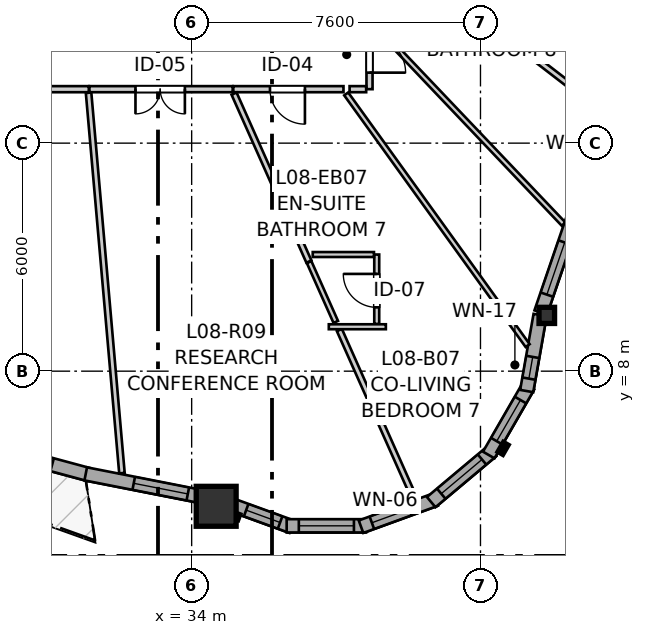
"""IFC4 building model, lengths in metres.
Left out: names, types, materials, properties, quantities, classifications, styles, units other than length and angle.
Written with IfcOpenShell. Run it as: python <this file> out.ifc"""

import sys

from ifc_helpers import new_model, si_unit, direction, frame, frame_2d, origin, origin_2d, place, context, subcontext, project, spatial, rectangle, i_section, extrude, source, transform, mapped, element, fill, save


model = new_model("IFC4")
c1 = context("Model", 3, precision=1e-05, world=origin(), true_north=direction((0.0, 1.0)))
c2 = subcontext(c1, "Body", "Model", "MODEL_VIEW")
j1 = project(units=[si_unit("LENGTHUNIT", "METRE"), si_unit("PLANEANGLEUNIT", "RADIAN")], contexts=[c1])
p1 = place(None, origin())
s1 = spatial("IfcSite", under=j1, at=p1, CompositionType="ELEMENT")
p2 = place(p1, origin())
s2 = spatial("IfcBuilding", under=s1, at=p2, CompositionType="ELEMENT")
p3 = place(p2, frame((0.0, 0.0, 30.2)))
s3 = spatial("IfcBuildingStorey", under=s2, at=p3, CompositionType="ELEMENT", Elevation=30.2)
m1 = source(origin(), c2, "Body", "SweptSolid", [
    extrude(rectangle(XDim=1.05, YDim=1.05, at=origin_2d()), origin(), (0.0, 0.0, 1.0), 2.935),
])
p4 = place(p3, frame((34.645, 4.445, 0.0), z_axis=(0.0, 0.0, 1.0), x_axis=(1.0, 0.0, 0.0)))
e1 = element("IfcColumn", 1, at=p4, inside=s3, PredefinedType="COLUMN", context=c2, shape_type="MappedRepresentation", body=[
    mapped(m1, transform((0.0, 0.0, 0.0), x_axis=(1.0, 0.0, 0.0), y_axis=(0.0, 1.0, 0.0), z_axis=(0.0, 0.0, 1.0), scale=1.0)),
])
m2 = source(origin(), c2, "Body", "SweptSolid", [
    extrude(i_section(OverallWidth=0.409, OverallDepth=0.425, WebThickness=0.03, FlangeThickness=0.048, FilletRadius=0.015, at=origin_2d()), origin(), (0.0, 0.0, 1.0), 2.935),
])
p5 = place(p3, frame((43.345, 9.468, 0.0), z_axis=(0.0, 0.0, 1.0), x_axis=(1.0, 0.0, 0.0)))
e2 = element("IfcColumn", 2, at=p5, inside=s3, PredefinedType="PILASTER", context=c2, shape_type="MappedRepresentation", body=[
    mapped(m2, transform((0.0, 0.0, 0.0), x_axis=(1.0, 0.0, 0.0), y_axis=(0.0, 1.0, 0.0), z_axis=(0.0, 0.0, 1.0), scale=1.0)),
])
p6 = place(p3, frame((27.978, 6.174, 0.0), z_axis=(0.0, 0.0, 1.0), x_axis=(0.965451765427, -0.260581827136, 0.0)))
e3 = element("IfcWall", 3, at=p6, inside=s3, PredefinedType="SOLIDWALL", context=c2, shape_type="SweptSolid", body=[
    extrude(rectangle(XDim=3.439, YDim=0.35, at=frame_2d((1.72, 0.0))), origin(), (0.0, 0.0, 1.0), 2.415),
])
p7 = place(p6, frame((0.985, 0.0, 0.82)))
e4 = element("IfcOpeningElement", 4, at=p7, cuts=e3, PredefinedType="OPENING", context=c2, shape_type="SweptSolid", body=[
    extrude(rectangle(XDim=1.45, YDim=1.25, at=frame_2d((0.725, 0.625))), frame((0.0, 0.185, 0.0), z_axis=(0.0, -1.0, 0.0), x_axis=(1.0, 0.0, 0.0)), (0.0, 0.0, 1.0), 0.37),
])
p8 = place(p3, frame((31.213, 5.298, 0.0), z_axis=(0.0, 0.0, 1.0), x_axis=(0.9812345335, -0.192818023709, 0.0)))
e5 = element("IfcWall", 5, at=p8, inside=s3, PredefinedType="SOLIDWALL", context=c2, shape_type="SweptSolid", body=[
    extrude(rectangle(XDim=3.232, YDim=0.35, at=frame_2d((1.616, 0.0))), origin(), (0.0, 0.0, 1.0), 2.415),
])
p9 = place(p8, frame((1.287, 0.0, 0.82)))
e6 = element("IfcOpeningElement", 6, at=p9, cuts=e5, PredefinedType="OPENING", context=c2, shape_type="SweptSolid", body=[
    extrude(rectangle(XDim=1.45, YDim=1.25, at=frame_2d((0.725, 0.625))), frame((0.0, 0.185, 0.0), z_axis=(0.0, -1.0, 0.0), x_axis=(1.0, 0.0, 0.0)), (0.0, 0.0, 1.0), 0.37),
])
p10 = place(p3, frame((34.987, 4.506, 0.0), z_axis=(0.0, 0.0, 1.0), x_axis=(0.939720171257, -0.341944439541, 0.0)))
e7 = element("IfcWall", 7, at=p10, inside=s3, PredefinedType="SOLIDWALL", context=c2, shape_type="SweptSolid", body=[
    extrude(rectangle(XDim=1.752, YDim=0.35, at=frame_2d((0.876, 0.0))), origin(), (0.0, 0.0, 1.0), 2.415),
])
p11 = place(p10, frame((0.476, 0.0, 0.82)))
e8 = element("IfcOpeningElement", 8, at=p11, cuts=e7, PredefinedType="OPENING", context=c2, shape_type="SweptSolid", body=[
    extrude(rectangle(XDim=0.95, YDim=1.35, at=frame_2d((0.475, 0.675))), frame((0.0, 0.185, 0.0), z_axis=(0.0, -1.0, 0.0), x_axis=(1.0, 0.0, 0.0)), (0.0, 0.0, 1.0), 0.37),
])
p12 = place(p3, frame((36.5, 3.931, 0.0), z_axis=(0.0, 0.0, 1.0), x_axis=(1.0, 0.0, 0.0)))
e9 = element("IfcWall", 9, at=p12, inside=s3, PredefinedType="SOLIDWALL", context=c2, shape_type="SweptSolid", body=[
    extrude(rectangle(XDim=2.09, YDim=0.35, at=frame_2d((1.045, 0.0))), origin(), (0.0, 0.0, 1.0), 2.415),
])
p13 = place(p12, frame((0.32, 0.0, 0.82)))
e10 = element("IfcOpeningElement", 10, at=p13, cuts=e9, PredefinedType="OPENING", context=c2, shape_type="SweptSolid", body=[
    extrude(rectangle(XDim=1.45, YDim=1.25, at=frame_2d((0.725, 0.625))), frame((0.0, 0.185, 0.0), z_axis=(0.0, -1.0, 0.0), x_axis=(1.0, 0.0, 0.0)), (0.0, 0.0, 1.0), 0.37),
])
p14 = place(p3, frame((38.457, 3.907, 0.0), z_axis=(0.0, 0.0, 1.0), x_axis=(0.939711556618, 0.341968113072, 0.0)))
e11 = element("IfcWall", 11, at=p14, inside=s3, PredefinedType="SOLIDWALL", context=c2, shape_type="SweptSolid", body=[
    extrude(rectangle(XDim=2.09, YDim=0.35, at=frame_2d((1.045, 0.0))), origin(), (0.0, 0.0, 1.0), 2.415),
])
p15 = place(p14, frame((0.304, 0.0, 0.82)))
e12 = element("IfcOpeningElement", 12, at=p15, cuts=e11, PredefinedType="OPENING", context=c2, shape_type="SweptSolid", body=[
    extrude(rectangle(XDim=1.05, YDim=1.45, at=frame_2d((0.525, 0.725))), frame((0.0, 0.185, 0.0), z_axis=(0.0, -1.0, 0.0), x_axis=(1.0, 0.0, 0.0)), (0.0, 0.0, 1.0), 0.37),
])
p16 = place(p3, frame((40.303, 4.554, 0.0), z_axis=(0.0, 0.0, 1.0), x_axis=(0.766024572719, 0.642811289563, 0.0)))
e13 = element("IfcWall", 13, at=p16, inside=s3, PredefinedType="SOLIDWALL", context=c2, shape_type="SweptSolid", body=[
    extrude(rectangle(XDim=2.09, YDim=0.35, at=frame_2d((1.045, 0.0))), origin(), (0.0, 0.0, 1.0), 2.415),
])
p17 = place(p16, frame((0.345, 0.0, 0.82)))
e14 = element("IfcOpeningElement", 14, at=p17, cuts=e13, PredefinedType="OPENING", context=c2, shape_type="SweptSolid", body=[
    extrude(rectangle(XDim=1.4, YDim=1.35, at=frame_2d((0.7, 0.675))), frame((0.0, 0.185, 0.0), z_axis=(0.0, -1.0, 0.0), x_axis=(1.0, 0.0, 0.0)), (0.0, 0.0, 1.0), 0.37),
])
p18 = place(p3, frame((41.817, 5.794, 0.0), z_axis=(0.0, 0.0, 1.0), x_axis=(0.499995423472, 0.866028046028, 0.0)))
e15 = element("IfcWall", 15, at=p18, inside=s3, PredefinedType="SOLIDWALL", context=c2, shape_type="SweptSolid", body=[
    extrude(rectangle(XDim=2.09, YDim=0.35, at=frame_2d((1.045, 0.0))), origin(), (0.0, 0.0, 1.0), 2.415),
])
p19 = place(p18, frame((0.42, 0.0, 0.82)))
e16 = element("IfcOpeningElement", 16, at=p19, cuts=e15, PredefinedType="OPENING", context=c2, shape_type="SweptSolid", body=[
    extrude(rectangle(XDim=1.25, YDim=1.35, at=frame_2d((0.625, 0.675))), frame((0.0, 0.185, 0.0), z_axis=(0.0, -1.0, 0.0), x_axis=(1.0, 0.0, 0.0)), (0.0, 0.0, 1.0), 0.37),
])
p20 = place(p3, frame((42.816, 7.477, 0.0), z_axis=(0.0, 0.0, 1.0), x_axis=(0.173586593252, 0.984818610021, 0.0)))
e17 = element("IfcWall", 17, at=p20, inside=s3, PredefinedType="SOLIDWALL", context=c2, shape_type="SweptSolid", body=[
    extrude(rectangle(XDim=2.032, YDim=0.35, at=frame_2d((1.016, 0.0))), origin(), (0.0, 0.0, 1.0), 2.415),
])
p21 = place(p20, frame((0.332, 0.0, 0.82)))
e18 = element("IfcOpeningElement", 18, at=p21, cuts=e17, PredefinedType="OPENING", context=c2, shape_type="SweptSolid", body=[
    extrude(rectangle(XDim=0.58, YDim=1.35, at=frame_2d((0.29, 0.675))), frame((0.0, 0.185, 0.0), z_axis=(0.0, -1.0, 0.0), x_axis=(1.0, 0.0, 0.0)), (0.0, 0.0, 1.0), 0.37),
])
p22 = place(p3, frame((43.186, 9.543, 0.0), z_axis=(0.0, 0.0, 1.0), x_axis=(0.323620542135, 0.946186950189, 0.0)))
e19 = element("IfcWall", 19, at=p22, inside=s3, PredefinedType="SOLIDWALL", context=c2, shape_type="SweptSolid", body=[
    extrude(rectangle(XDim=3.512, YDim=0.35, at=frame_2d((1.756, 0.0))), origin(), (0.0, 0.0, 1.0), 2.415),
])
p23 = place(p22, frame((0.498, 0.0, 0.82)))
e20 = element("IfcOpeningElement", 20, at=p23, cuts=e19, PredefinedType="OPENING", context=c2, shape_type="SweptSolid", body=[
    extrude(rectangle(XDim=1.45, YDim=1.25, at=frame_2d((0.725, 0.625))), frame((0.0, 0.185, 0.0), z_axis=(0.0, -1.0, 0.0), x_axis=(1.0, 0.0, 0.0)), (0.0, 0.0, 1.0), 0.37),
])
p24 = place(p22, frame((2.619, 0.0, 0.82)))
e21 = element("IfcOpeningElement", 21, at=p24, cuts=e19, PredefinedType="OPENING", context=c2, shape_type="SweptSolid", body=[
    extrude(rectangle(XDim=0.58, YDim=1.35, at=frame_2d((0.29, 0.675))), frame((0.0, 0.185, 0.0), z_axis=(0.0, -1.0, 0.0), x_axis=(1.0, 0.0, 0.0)), (0.0, 0.0, 1.0), 0.37),
])
p25 = place(p3, frame((31.294, 15.42, 0.0), z_axis=(0.0, 0.0, 1.0), x_axis=(-1.0, 0.0, 0.0)))
e22 = element("IfcWall", 22, at=p25, inside=s3, PredefinedType="PARTITIONING", context=c2, shape_type="SweptSolid", body=[
    extrude(rectangle(XDim=5.554, YDim=0.16, at=frame_2d((2.777, 0.0))), origin(), (0.0, 0.0, 1.0), 2.935),
])
p26 = place(p25, frame((2.126, 0.0, 0.0)))
e23 = element("IfcOpeningElement", 23, at=p26, cuts=e22, PredefinedType="OPENING", context=c2, shape_type="SweptSolid", body=[
    extrude(rectangle(XDim=1.3, YDim=2.1, at=frame_2d((0.65, 1.05))), frame((0.0, 0.09, 0.0), z_axis=(0.0, -1.0, 0.0), x_axis=(1.0, 0.0, 0.0)), (0.0, 0.0, 1.0), 0.18),
])
p27 = place(p3, frame((35.08, 15.42, 0.0), z_axis=(0.0, 0.0, 1.0), x_axis=(-1.0, 0.0, 0.0)))
e24 = element("IfcWall", 24, at=p27, inside=s3, PredefinedType="PARTITIONING", context=c2, shape_type="SweptSolid", body=[
    extrude(rectangle(XDim=3.771, YDim=0.16, at=frame_2d((1.885, 0.0))), origin(), (0.0, 0.0, 1.0), 2.935),
])
p28 = place(p27, frame((1.259, 0.0, 0.0)))
e25 = element("IfcOpeningElement", 25, at=p28, cuts=e24, PredefinedType="OPENING", context=c2, shape_type="SweptSolid", body=[
    extrude(rectangle(XDim=1.3, YDim=2.1, at=frame_2d((0.65, 1.05))), frame((0.0, 0.09, 0.0), z_axis=(0.0, -1.0, 0.0), x_axis=(1.0, 0.0, 0.0)), (0.0, 0.0, 1.0), 0.18),
])
p29 = place(p3, frame((37.995, 15.42, 0.0), z_axis=(0.0, 0.0, 1.0), x_axis=(-1.0, 0.0, 0.0)))
e26 = element("IfcWall", 26, at=p29, inside=s3, PredefinedType="PARTITIONING", context=c2, shape_type="SweptSolid", body=[
    extrude(rectangle(XDim=2.9, YDim=0.16, at=frame_2d((1.45, 0.0))), origin(), (0.0, 0.0, 1.0), 2.935),
])
p30 = place(p29, frame((1.014, 0.0, 0.0)))
e27 = element("IfcOpeningElement", 27, at=p30, cuts=e26, PredefinedType="OPENING", context=c2, shape_type="SweptSolid", body=[
    extrude(rectangle(XDim=0.92, YDim=2.1, at=frame_2d((0.46, 1.05))), frame((0.0, 0.09, 0.0), z_axis=(0.0, -1.0, 0.0), x_axis=(1.0, 0.0, 0.0)), (0.0, 0.0, 1.0), 0.18),
])
p31 = place(p3, frame((38.87, 9.242, 0.0), z_axis=(0.0, 0.0, 1.0), x_axis=(0.0, 1.0, 0.0)))
e28 = element("IfcWall", 28, at=p31, inside=s3, PredefinedType="PARTITIONING", context=c2, shape_type="SweptSolid", body=[
    extrude(rectangle(XDim=1.827, YDim=0.13, at=frame_2d((0.914, 0.0))), origin(), (0.0, 0.0, 1.0), 2.935),
])
p32 = place(p31, frame((0.437, 0.0, 0.0)))
e29 = element("IfcOpeningElement", 29, at=p32, cuts=e28, PredefinedType="OPENING", context=c2, shape_type="SweptSolid", body=[
    extrude(rectangle(XDim=0.88, YDim=2.05, at=frame_2d((0.44, 1.025))), frame((0.0, 0.075, 0.0), z_axis=(0.0, -1.0, 0.0), x_axis=(1.0, 0.0, 0.0)), (0.0, 0.0, 1.0), 0.15),
])
p33 = place(p3, frame((38.68, 17.203, 0.0), z_axis=(0.0, 0.0, 1.0), x_axis=(0.0, -1.0, 0.0)))
e30 = element("IfcWall", 30, at=p33, inside=s3, PredefinedType="PARTITIONING", context=c2, shape_type="SweptSolid", body=[
    extrude(rectangle(XDim=1.783, YDim=0.16, at=frame_2d((0.892, 0.0))), origin(), (0.0, 0.0, 1.0), 2.935),
])
p34 = place(p33, frame((0.398, 0.0, 0.0)))
e31 = element("IfcOpeningElement", 31, at=p34, cuts=e30, PredefinedType="OPENING", context=c2, shape_type="SweptSolid", body=[
    extrude(rectangle(XDim=0.95, YDim=2.1, at=frame_2d((0.475, 1.05))), frame((0.0, 0.09, 0.0), z_axis=(0.0, -1.0, 0.0), x_axis=(1.0, 0.0, 0.0)), (0.0, 0.0, 1.0), 0.18),
])
p35 = place(p3, frame((31.287, 15.326, 0.0), z_axis=(0.0, 0.0, 1.0), x_axis=(0.087404477037, -0.99617290537, 0.0)))
e32 = element("IfcWall", 32, at=p35, inside=s3, PredefinedType="PARTITIONING", context=c2, shape_type="SweptSolid", body=[
    extrude(rectangle(XDim=10.047, YDim=0.145, at=frame_2d((5.023, 0.0))), origin(), (0.0, 0.0, 1.0), 2.935),
])
p36 = place(p3, frame((38.067, 15.295, 0.0), z_axis=(0.0, 0.0, 1.0), x_axis=(0.584777320582, -0.811193864211, 0.0)))
e33 = element("IfcWall", 33, at=p36, inside=s3, PredefinedType="PARTITIONING", context=c2, shape_type="SweptSolid", body=[
    extrude(rectangle(XDim=8.164, YDim=0.13, at=frame_2d((4.082, 0.0))), origin(), (0.0, 0.0, 1.0), 2.935),
])
p37 = place(p3, frame((38.812, 17.101, 0.0), z_axis=(0.0, 0.0, 1.0), x_axis=(0.689140556814, -0.724627692649, 0.0)))
e34 = element("IfcWall", 34, at=p37, inside=s3, PredefinedType="PARTITIONING", context=c2, shape_type="SweptSolid", body=[
    extrude(rectangle(XDim=7.217, YDim=0.13, at=frame_2d((3.608, 0.0))), origin(), (0.0, 0.0, 1.0), 2.935),
])
p38 = place(p3, frame((40.649, 18.066, 0.0), z_axis=(0.0, 0.0, 1.0), x_axis=(0.792155051101, -0.610319895641, 0.0)))
e35 = element("IfcWall", 35, at=p38, inside=s3, PredefinedType="PARTITIONING", context=c2, shape_type="SweptSolid", body=[
    extrude(rectangle(XDim=5.093, YDim=0.145, at=frame_2d((2.546, 0.0))), origin(), (0.0, 0.0, 1.0), 2.935),
])
p39 = place(p3, frame((37.887, 9.082, 0.0), z_axis=(0.0, 0.0, 1.0), x_axis=(0.406941066305, -0.913454415149, 0.0)))
e36 = element("IfcWall", 36, at=p39, inside=s3, PredefinedType="PARTITIONING", context=c2, shape_type="SweptSolid", body=[
    extrude(rectangle(XDim=4.882, YDim=0.145, at=frame_2d((2.441, 0.0))), origin(), (0.0, 0.0, 1.0), 2.935),
])
p40 = place(p3, frame((35.116, 15.303, 0.0), z_axis=(0.0, 0.0, 1.0), x_axis=(0.406910733823, -0.913467927571, 0.0)))
e37 = element("IfcWall", 37, at=p40, inside=s3, PredefinedType="PARTITIONING", context=c2, shape_type="SweptSolid", body=[
    extrude(rectangle(XDim=4.839, YDim=0.145, at=frame_2d((2.419, 0.0))), origin(), (0.0, 0.0, 1.0), 2.935),
])
p41 = place(p3, frame((37.091, 10.869, 0.0), z_axis=(0.0, 0.0, 1.0), x_axis=(0.406835672622, -0.913501360416, 0.0)))
e38 = element("IfcWall", 38, at=p41, inside=s3, PredefinedType="PARTITIONING", context=c2, shape_type="SweptSolid", body=[
    extrude(rectangle(XDim=1.722, YDim=0.13, at=frame_2d((0.861, 0.0))), origin(), (0.0, 0.0, 1.0), 2.935),
])
p42 = place(p3, frame((37.186, 11.069, 0.0), z_axis=(0.0, 0.0, 1.0), x_axis=(1.0, 0.0, 0.0)))
e39 = element("IfcWall", 39, at=p42, inside=s3, PredefinedType="PARTITIONING", context=c2, shape_type="SweptSolid", body=[
    extrude(rectangle(XDim=1.611, YDim=0.13, at=frame_2d((0.805, 0.0))), origin(), (0.0, 0.0, 1.0), 2.935),
])
p43 = place(p3, frame((37.609, 9.169, 0.0), z_axis=(0.0, 0.0, 1.0), x_axis=(1.0, 0.0, 0.0)))
e40 = element("IfcWall", 40, at=p43, inside=s3, PredefinedType="PARTITIONING", context=c2, shape_type="SweptSolid", body=[
    extrude(rectangle(XDim=1.501, YDim=0.13, at=frame_2d((0.75, 0.0))), origin(), (0.0, 0.0, 1.0), 2.935),
])
p44 = place(p3, frame((38.156, 15.42, 0.0), z_axis=(0.0, 0.0, 1.0), x_axis=(1.0, 0.0, 0.0)))
e41 = element("IfcWall", 41, at=p44, inside=s3, PredefinedType="PARTITIONING", context=c2, shape_type="SweptSolid", body=[
    extrude(rectangle(XDim=0.436, YDim=0.16, at=frame_2d((0.218, 0.0))), origin(), (0.0, 0.0, 1.0), 2.935),
])
m3 = source(origin(), c2, "Body", "SweptSolid", [
    extrude(rectangle(XDim=1.45, YDim=1.25, at=frame_2d((0.725, 0.625))), frame((0.0, 0.03, 0.0), z_axis=(0.0, -1.0, 0.0), x_axis=(1.0, 0.0, 0.0)), (0.0, 0.0, 1.0), 0.06),
])
p45 = place(p7, origin())
e42 = element("IfcWindow", 42, at=p45, inside=s3, PartitioningType="SINGLE_PANEL", PredefinedType="WINDOW", context=c2, shape_type="MappedRepresentation", body=[
    mapped(m3, transform((0.0, 0.0, 0.0), x_axis=(1.0, 0.0, 0.0), y_axis=(0.0, 1.0, 0.0), z_axis=(0.0, 0.0, 1.0), scale=1.0)),
])
fill(e4, e42)
p46 = place(p9, origin())
e43 = element("IfcWindow", 43, at=p46, inside=s3, PartitioningType="SINGLE_PANEL", PredefinedType="WINDOW", context=c2, shape_type="MappedRepresentation", body=[
    mapped(m3, transform((0.0, 0.0, 0.0), x_axis=(1.0, 0.0, 0.0), y_axis=(0.0, 1.0, 0.0), z_axis=(0.0, 0.0, 1.0), scale=1.0)),
])
fill(e6, e43)
m4 = source(origin(), c2, "Body", "SweptSolid", [
    extrude(rectangle(XDim=0.95, YDim=1.35, at=frame_2d((0.475, 0.675))), frame((0.0, 0.03, 0.0), z_axis=(0.0, -1.0, 0.0), x_axis=(1.0, 0.0, 0.0)), (0.0, 0.0, 1.0), 0.06),
])
p47 = place(p11, origin())
e44 = element("IfcWindow", 44, at=p47, inside=s3, PartitioningType="SINGLE_PANEL", PredefinedType="WINDOW", context=c2, shape_type="MappedRepresentation", body=[
    mapped(m4, transform((0.0, 0.0, 0.0), x_axis=(1.0, 0.0, 0.0), y_axis=(0.0, 1.0, 0.0), z_axis=(0.0, 0.0, 1.0), scale=1.0)),
])
fill(e8, e44)
p48 = place(p13, origin())
e45 = element("IfcWindow", 45, at=p48, inside=s3, PartitioningType="SINGLE_PANEL", PredefinedType="WINDOW", context=c2, shape_type="MappedRepresentation", body=[
    mapped(m3, transform((0.0, 0.0, 0.0), x_axis=(1.0, 0.0, 0.0), y_axis=(0.0, 1.0, 0.0), z_axis=(0.0, 0.0, 1.0), scale=1.0)),
])
fill(e10, e45)
m5 = source(origin(), c2, "Body", "SweptSolid", [
    extrude(rectangle(XDim=1.05, YDim=1.45, at=frame_2d((0.525, 0.725))), frame((0.0, 0.03, 0.0), z_axis=(0.0, -1.0, 0.0), x_axis=(1.0, 0.0, 0.0)), (0.0, 0.0, 1.0), 0.06),
])
p49 = place(p15, origin())
e46 = element("IfcWindow", 46, at=p49, inside=s3, PartitioningType="SINGLE_PANEL", PredefinedType="WINDOW", context=c2, shape_type="MappedRepresentation", body=[
    mapped(m5, transform((0.0, 0.0, 0.0), x_axis=(1.0, 0.0, 0.0), y_axis=(0.0, 1.0, 0.0), z_axis=(0.0, 0.0, 1.0), scale=1.0)),
])
fill(e12, e46)
m6 = source(origin(), c2, "Body", "SweptSolid", [
    extrude(rectangle(XDim=1.4, YDim=1.35, at=frame_2d((0.7, 0.675))), frame((0.0, 0.03, 0.0), z_axis=(0.0, -1.0, 0.0), x_axis=(1.0, 0.0, 0.0)), (0.0, 0.0, 1.0), 0.06),
])
p50 = place(p17, origin())
e47 = element("IfcWindow", 47, at=p50, inside=s3, PartitioningType="SINGLE_PANEL", PredefinedType="WINDOW", context=c2, shape_type="MappedRepresentation", body=[
    mapped(m6, transform((0.0, 0.0, 0.0), x_axis=(1.0, 0.0, 0.0), y_axis=(0.0, 1.0, 0.0), z_axis=(0.0, 0.0, 1.0), scale=1.0)),
])
fill(e14, e47)
m7 = source(origin(), c2, "Body", "SweptSolid", [
    extrude(rectangle(XDim=1.25, YDim=1.35, at=frame_2d((0.625, 0.675))), frame((0.0, 0.03, 0.0), z_axis=(0.0, -1.0, 0.0), x_axis=(1.0, 0.0, 0.0)), (0.0, 0.0, 1.0), 0.06),
])
p51 = place(p19, origin())
e48 = element("IfcWindow", 48, at=p51, inside=s3, PartitioningType="SINGLE_PANEL", PredefinedType="WINDOW", context=c2, shape_type="MappedRepresentation", body=[
    mapped(m7, transform((0.0, 0.0, 0.0), x_axis=(1.0, 0.0, 0.0), y_axis=(0.0, 1.0, 0.0), z_axis=(0.0, 0.0, 1.0), scale=1.0)),
])
fill(e16, e48)
m8 = source(origin(), c2, "Body", "SweptSolid", [
    extrude(rectangle(XDim=0.58, YDim=1.35, at=frame_2d((0.29, 0.675))), frame((0.0, 0.03, 0.0), z_axis=(0.0, -1.0, 0.0), x_axis=(1.0, 0.0, 0.0)), (0.0, 0.0, 1.0), 0.06),
])
p52 = place(p21, origin())
e49 = element("IfcWindow", 49, at=p52, inside=s3, PartitioningType="SINGLE_PANEL", PredefinedType="WINDOW", context=c2, shape_type="MappedRepresentation", body=[
    mapped(m8, transform((0.0, 0.0, 0.0), x_axis=(1.0, 0.0, 0.0), y_axis=(0.0, 1.0, 0.0), z_axis=(0.0, 0.0, 1.0), scale=1.0)),
])
fill(e18, e49)
p53 = place(p23, origin())
e50 = element("IfcWindow", 50, at=p53, inside=s3, PartitioningType="SINGLE_PANEL", PredefinedType="WINDOW", context=c2, shape_type="MappedRepresentation", body=[
    mapped(m3, transform((0.0, 0.0, 0.0), x_axis=(1.0, 0.0, 0.0), y_axis=(0.0, 1.0, 0.0), z_axis=(0.0, 0.0, 1.0), scale=1.0)),
])
fill(e20, e50)
m9 = source(origin(), c2, "Body", "SweptSolid", [
    extrude(rectangle(XDim=1.3, YDim=2.1, at=frame_2d((0.65, 1.05))), frame((0.0, 0.025, 0.0), z_axis=(0.0, -1.0, 0.0), x_axis=(1.0, 0.0, 0.0)), (0.0, 0.0, 1.0), 0.05),
])
p54 = place(p28, origin())
e51 = element("IfcDoor", 51, at=p54, inside=s3, OperationType="DOUBLE_DOOR_SINGLE_SWING", PredefinedType="DOOR", context=c2, shape_type="MappedRepresentation", body=[
    mapped(m9, transform((0.0, 0.0, 0.0), x_axis=(1.0, 0.0, 0.0), y_axis=(0.0, 1.0, 0.0), z_axis=(0.0, 0.0, 1.0), scale=1.0)),
])
fill(e25, e51)
m10 = source(origin(), c2, "Body", "SweptSolid", [
    extrude(rectangle(XDim=0.92, YDim=2.1, at=frame_2d((0.46, 1.05))), frame((0.0, 0.025, 0.0), z_axis=(0.0, -1.0, 0.0), x_axis=(1.0, 0.0, 0.0)), (0.0, 0.0, 1.0), 0.05),
])
p55 = place(p30, origin())
e52 = element("IfcDoor", 52, at=p55, inside=s3, OperationType="SINGLE_SWING_LEFT", PredefinedType="DOOR", context=c2, shape_type="MappedRepresentation", body=[
    mapped(m10, transform((0.0, 0.0, 0.0), x_axis=(1.0, 0.0, 0.0), y_axis=(0.0, 1.0, 0.0), z_axis=(0.0, 0.0, 1.0), scale=1.0)),
])
fill(e27, e52)
m11 = source(origin(), c2, "Body", "SweptSolid", [
    extrude(rectangle(XDim=0.88, YDim=2.05, at=frame_2d((0.44, 1.025))), frame((0.0, 0.025, 0.0), z_axis=(0.0, -1.0, 0.0), x_axis=(1.0, 0.0, 0.0)), (0.0, 0.0, 1.0), 0.05),
])
p56 = place(p32, origin())
e53 = element("IfcDoor", 53, at=p56, inside=s3, OperationType="SINGLE_SWING_RIGHT", PredefinedType="DOOR", context=c2, shape_type="MappedRepresentation", body=[
    mapped(m11, transform((0.0, 0.0, 0.0), x_axis=(1.0, 0.0, 0.0), y_axis=(0.0, 1.0, 0.0), z_axis=(0.0, 0.0, 1.0), scale=1.0)),
])
fill(e29, e53)
m12 = source(origin(), c2, "Body", "SweptSolid", [
    extrude(rectangle(XDim=0.95, YDim=2.1, at=frame_2d((0.475, 1.05))), frame((0.0, 0.025, 0.0), z_axis=(0.0, -1.0, 0.0), x_axis=(1.0, 0.0, 0.0)), (0.0, 0.0, 1.0), 0.05),
])
p57 = place(p34, origin())
e54 = element("IfcDoor", 54, at=p57, inside=s3, OperationType="SINGLE_SWING_RIGHT", PredefinedType="DOOR", context=c2, shape_type="MappedRepresentation", body=[
    mapped(m12, transform((0.0, 0.0, 0.0), x_axis=(1.0, 0.0, 0.0), y_axis=(0.0, 1.0, 0.0), z_axis=(0.0, 0.0, 1.0), scale=1.0)),
])
fill(e31, e54)
save(model, sys.argv[1])
